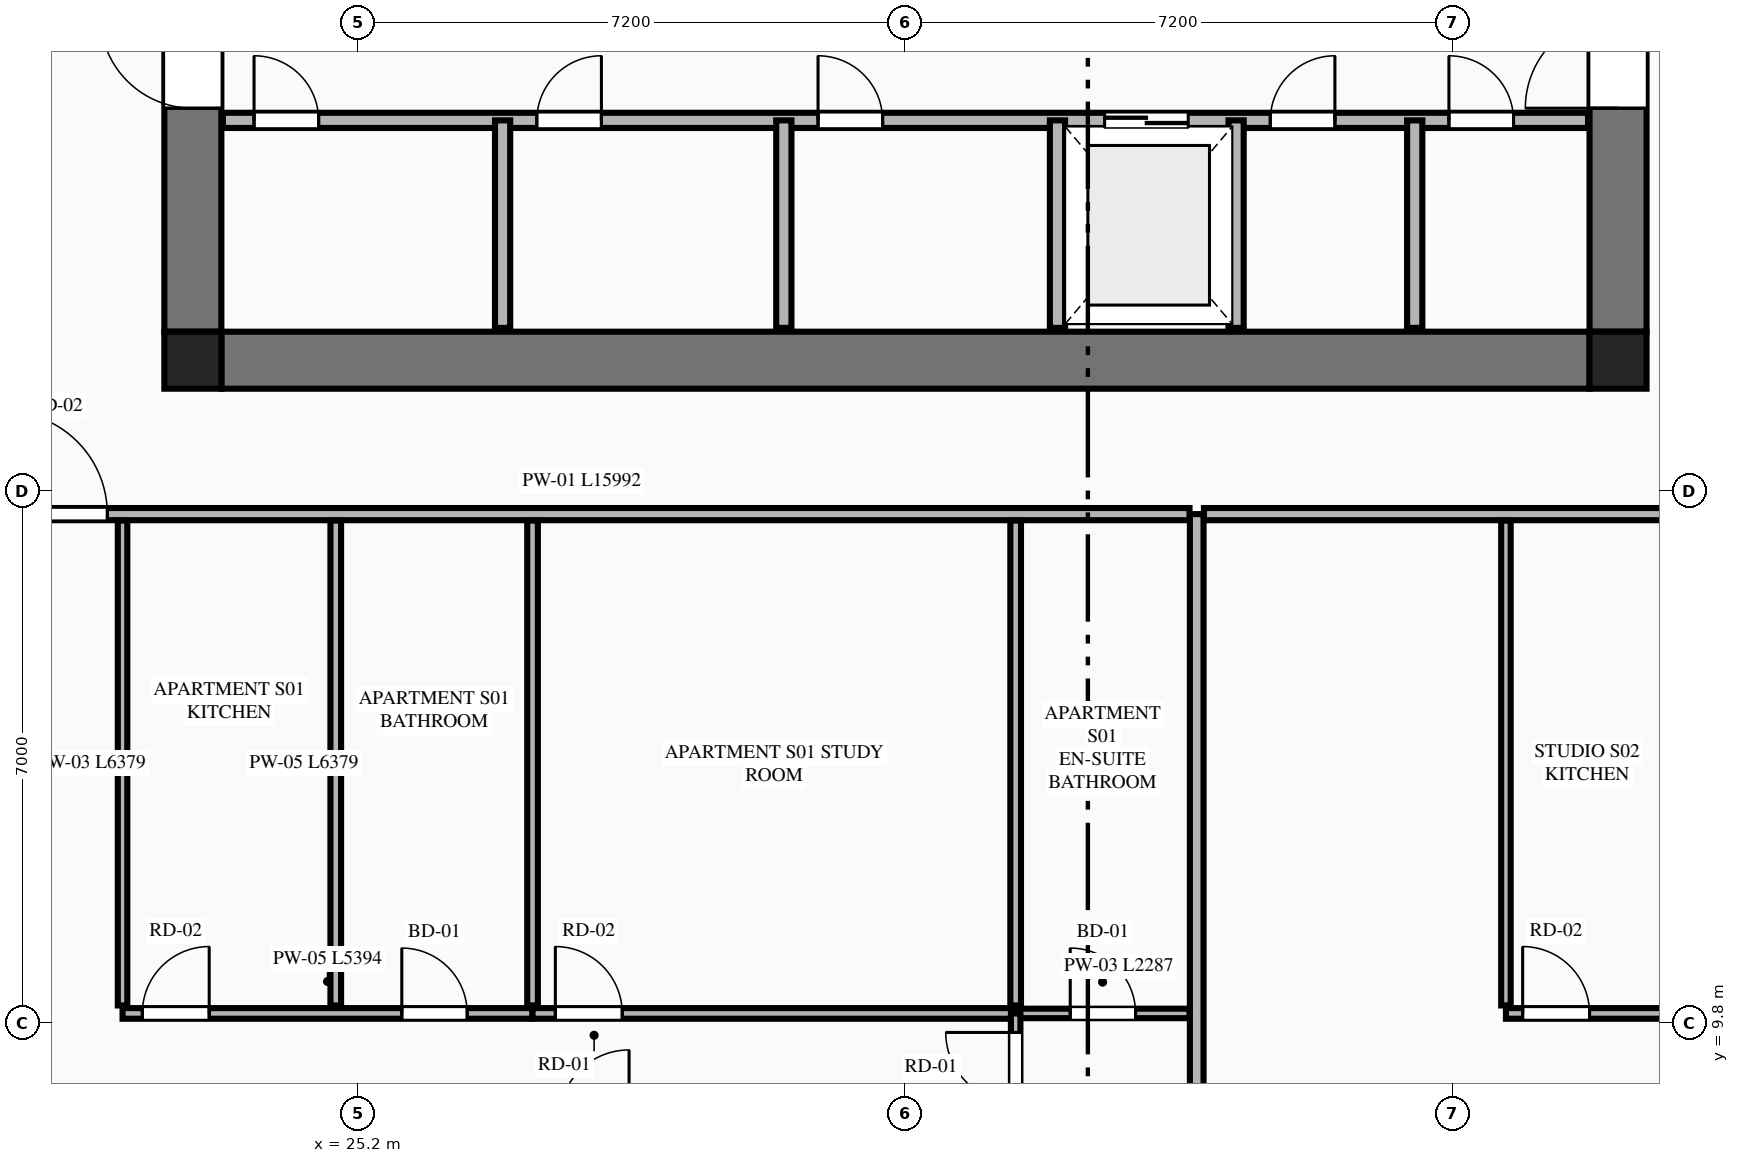
"""IFC4 building model, lengths in metres.
Left out: names, types, materials, properties, quantities, classifications, styles, units other than length and angle.
Written with IfcOpenShell. Run it as: python <this file> out.ifc"""

import sys

from ifc_helpers import new_model, si_unit, direction, frame, frame_2d, origin, origin_2d, place, context, subcontext, project, spatial, rectangle, extrude, element, fill, save


model = new_model("IFC4")
c1 = context("Model", 3, precision=1e-05, world=origin(), true_north=direction((0.0, 1.0)))
c2 = subcontext(c1, "Body", "Model", "MODEL_VIEW")
j1 = project(units=[si_unit("LENGTHUNIT", "METRE"), si_unit("PLANEANGLEUNIT", "RADIAN")], contexts=[c1])
p1 = place(None, origin())
s1 = spatial("IfcSite", under=j1, at=p1, CompositionType="ELEMENT")
p2 = place(p1, origin())
s2 = spatial("IfcBuilding", under=s1, at=p2, CompositionType="ELEMENT")
p3 = place(p2, frame((0.0, 0.0, 109.05)))
s3 = spatial("IfcBuildingStorey", under=s2, at=p3, CompositionType="ELEMENT", Elevation=109.05)
for number, where, z_axis, x_axis in (
    (1, (23.025, 18.525, 0.0), (0.0, 0.0, 1.0), (1.0, 0.0, 0.0)),
    (2, (41.775, 18.525, 0.0), (0.0, 0.0, 1.0), (1.0, 0.0, 0.0)),
):
    element("IfcColumn", number, at=place(p3, frame(where, z_axis=z_axis, x_axis=x_axis)), inside=s3, PredefinedType="COLUMN", context=c2, shape_type="SweptSolid", body=[
        extrude(rectangle(XDim=0.75, YDim=0.75, at=origin_2d()), origin(), (0.0, 0.0, 1.0), 3.55),
    ])
p4 = place(p3, frame((23.4, 18.525, 0.0), z_axis=(0.0, 0.0, 1.0), x_axis=(1.0, 0.0, 0.0)))
e3 = element("IfcWall", 3, at=p4, inside=s3, PredefinedType="SHEAR", context=c2, shape_type="SweptSolid", body=[
    extrude(rectangle(XDim=18.0, YDim=0.75, at=frame_2d((9.0, 0.0))), origin(), (0.0, 0.0, 1.0), 3.34),
])
p5 = place(p3, frame((23.025, 18.9, 0.0), z_axis=(0.0, 0.0, 1.0), x_axis=(0.0, 1.0, 0.0)))
e4 = element("IfcWall", 4, at=p5, inside=s3, PredefinedType="SHEAR", context=c2, shape_type="SweptSolid", body=[
    extrude(rectangle(XDim=14.0, YDim=0.75, at=frame_2d((7.0, 0.0))), origin(), (0.0, 0.0, 1.0), 3.34),
])
p6 = place(p5, frame((2.94, 0.0, 0.0)))
e5 = element("IfcOpeningElement", 5, at=p6, cuts=e4, PredefinedType="OPENING", context=c2, shape_type="SweptSolid", body=[
    extrude(rectangle(XDim=1.22, YDim=2.25, at=frame_2d((0.61, 1.125))), frame((0.0, 0.385, 0.0), z_axis=(0.0, -1.0, 0.0), x_axis=(1.0, 0.0, 0.0)), (0.0, 0.0, 1.0), 0.77),
])
p7 = place(p3, frame((41.775, 18.9, 0.0), z_axis=(0.0, 0.0, 1.0), x_axis=(0.0, 1.0, 0.0)))
e6 = element("IfcWall", 6, at=p7, inside=s3, PredefinedType="SHEAR", context=c2, shape_type="SweptSolid", body=[
    extrude(rectangle(XDim=14.0, YDim=0.75, at=frame_2d((7.0, 0.0))), origin(), (0.0, 0.0, 1.0), 3.34),
])
p8 = place(p7, frame((2.94, 0.0, 0.0)))
e7 = element("IfcOpeningElement", 7, at=p8, cuts=e6, PredefinedType="OPENING", context=c2, shape_type="SweptSolid", body=[
    extrude(rectangle(XDim=1.22, YDim=2.25, at=frame_2d((0.61, 1.125))), frame((0.0, 0.385, 0.0), z_axis=(0.0, -1.0, 0.0), x_axis=(1.0, 0.0, 0.0)), (0.0, 0.0, 1.0), 0.77),
])
p9 = place(p3, frame((23.42, 21.68, 0.0), z_axis=(0.0, 0.0, 1.0), x_axis=(1.0, 0.0, 0.0)))
e8 = element("IfcWall", 8, at=p9, inside=s3, PredefinedType="PLUMBINGWALL", context=c2, shape_type="SweptSolid", body=[
    extrude(rectangle(XDim=17.96, YDim=0.2, at=frame_2d((8.98, 0.0))), origin(), (0.0, 0.0, 1.0), 3.34),
])
p10 = place(p9, frame((11.6, 0.0, 0.0)))
e9 = element("IfcOpeningElement", 9, at=p10, cuts=e8, PredefinedType="OPENING", context=c2, shape_type="SweptSolid", body=[
    extrude(rectangle(XDim=1.1, YDim=2.2, at=frame_2d((0.55, 1.1))), frame((0.0, 0.11, 0.0), z_axis=(0.0, -1.0, 0.0), x_axis=(1.0, 0.0, 0.0)), (0.0, 0.0, 1.0), 0.22),
])
p11 = place(p9, frame((0.41, 0.0, 0.0)))
e10 = element("IfcOpeningElement", 10, at=p11, cuts=e8, PredefinedType="OPENING", context=c2, shape_type="SweptSolid", body=[
    extrude(rectangle(XDim=0.85, YDim=2.05, at=frame_2d((0.425, 1.025))), frame((0.0, 0.11, 0.0), z_axis=(0.0, -1.0, 0.0), x_axis=(1.0, 0.0, 0.0)), (0.0, 0.0, 1.0), 0.22),
])
p12 = place(p9, frame((4.13, 0.0, 0.0)))
e11 = element("IfcOpeningElement", 11, at=p12, cuts=e8, PredefinedType="OPENING", context=c2, shape_type="SweptSolid", body=[
    extrude(rectangle(XDim=0.85, YDim=2.05, at=frame_2d((0.425, 1.025))), frame((0.0, 0.11, 0.0), z_axis=(0.0, -1.0, 0.0), x_axis=(1.0, 0.0, 0.0)), (0.0, 0.0, 1.0), 0.22),
])
p13 = place(p9, frame((7.83, 0.0, 0.0)))
e12 = element("IfcOpeningElement", 12, at=p13, cuts=e8, PredefinedType="OPENING", context=c2, shape_type="SweptSolid", body=[
    extrude(rectangle(XDim=0.85, YDim=2.05, at=frame_2d((0.425, 1.025))), frame((0.0, 0.11, 0.0), z_axis=(0.0, -1.0, 0.0), x_axis=(1.0, 0.0, 0.0)), (0.0, 0.0, 1.0), 0.22),
])
p14 = place(p9, frame((13.78, 0.0, 0.0)))
e13 = element("IfcOpeningElement", 13, at=p14, cuts=e8, PredefinedType="OPENING", context=c2, shape_type="SweptSolid", body=[
    extrude(rectangle(XDim=0.85, YDim=2.05, at=frame_2d((0.425, 1.025))), frame((0.0, 0.11, 0.0), z_axis=(0.0, -1.0, 0.0), x_axis=(1.0, 0.0, 0.0)), (0.0, 0.0, 1.0), 0.22),
])
p15 = place(p9, frame((16.13, 0.0, 0.0)))
e14 = element("IfcOpeningElement", 14, at=p15, cuts=e8, PredefinedType="OPENING", context=c2, shape_type="SweptSolid", body=[
    extrude(rectangle(XDim=0.85, YDim=2.05, at=frame_2d((0.425, 1.025))), frame((0.0, 0.11, 0.0), z_axis=(0.0, -1.0, 0.0), x_axis=(1.0, 0.0, 0.0)), (0.0, 0.0, 1.0), 0.22),
])
for number, where, z_axis, x_axis in (
    (15, (34.4, 18.95, 0.0), (0.0, 0.0, 1.0), (0.0, 1.0, 0.0)),
    (16, (36.75, 18.95, 0.0), (0.0, 0.0, 1.0), (0.0, 1.0, 0.0)),
    (17, (27.1, 18.95, 0.0), (0.0, 0.0, 1.0), (0.0, 1.0, 0.0)),
    (18, (30.8, 18.95, 0.0), (0.0, 0.0, 1.0), (0.0, 1.0, 0.0)),
    (19, (39.1, 18.95, 0.0), (0.0, 0.0, 1.0), (0.0, 1.0, 0.0)),
):
    element("IfcWall", number, at=place(p3, frame(where, z_axis=z_axis, x_axis=x_axis)), inside=s3, PredefinedType="PLUMBINGWALL", context=c2, shape_type="SweptSolid", body=[
        extrude(rectangle(XDim=2.73, YDim=0.2, at=frame_2d((1.365, 0.0))), origin(), (0.0, 0.0, 1.0), 3.34),
    ])
p16 = place(p3, frame((36.232, 4.105, 0.0), z_axis=(0.0, 0.0, 1.0), x_axis=(0.0, 1.0, 0.0)))
e20 = element("IfcWall", 20, at=p16, inside=s3, PredefinedType="PARTITIONING", context=c2, shape_type="SweptSolid", body=[
    extrude(rectangle(XDim=12.395, YDim=0.18, at=frame_2d((6.198, 0.0))), origin(), (0.0, 0.0, 1.0), 2.722),
])
p17 = place(p3, frame((20.145, 16.5, 0.0), z_axis=(0.0, 0.0, 1.0), x_axis=(1.0, 0.0, 0.0)))
e21 = element("IfcWall", 21, at=p17, inside=s3, PredefinedType="PARTITIONING", context=c2, shape_type="SweptSolid", body=[
    extrude(rectangle(XDim=15.992, YDim=0.16, at=frame_2d((7.996, 0.0))), origin(), (0.0, 0.0, 1.0), 3.34),
])
p18 = place(p17, frame((0.405, 0.0, 0.0)))
e22 = element("IfcOpeningElement", 22, at=p18, cuts=e21, PredefinedType="OPENING", context=c2, shape_type="SweptSolid", body=[
    extrude(rectangle(XDim=1.35, YDim=2.35, at=frame_2d((0.675, 1.175))), frame((0.0, 0.09, 0.0), z_axis=(0.0, -1.0, 0.0), x_axis=(1.0, 0.0, 0.0)), (0.0, 0.0, 1.0), 0.18),
])
p19 = place(p3, frame((22.1, 10.036, 0.0), z_axis=(0.0, 0.0, 1.0), x_axis=(0.0, 1.0, 0.0)))
e23 = element("IfcWall", 23, at=p19, inside=s3, PredefinedType="PARTITIONING", context=c2, shape_type="SweptSolid", body=[
    extrude(rectangle(XDim=6.379, YDim=0.125, at=frame_2d((3.189, 0.0))), origin(), (0.0, 0.0, 1.0), 2.722),
])
p20 = place(p3, frame((22.1, 9.931, 0.0), z_axis=(0.0, 0.0, 1.0), x_axis=(1.0, 0.0, 0.0)))
e24 = element("IfcWall", 24, at=p20, inside=s3, PredefinedType="PLUMBINGWALL", context=c2, shape_type="SweptSolid", body=[
    extrude(rectangle(XDim=5.394, YDim=0.14, at=frame_2d((2.697, 0.0))), origin(), (0.0, 0.0, 1.0), 3.34),
])
p21 = place(p20, frame((3.674, 0.0, 0.0)))
e25 = element("IfcOpeningElement", 25, at=p21, cuts=e24, PredefinedType="OPENING", context=c2, shape_type="SweptSolid", body=[
    extrude(rectangle(XDim=0.86, YDim=2.1, at=frame_2d((0.43, 1.05))), frame((0.0, 0.08, 0.0), z_axis=(0.0, -1.0, 0.0), x_axis=(1.0, 0.0, 0.0)), (0.0, 0.0, 1.0), 0.16),
])
p22 = place(p20, frame((0.26, 0.0, 0.0)))
e26 = element("IfcOpeningElement", 26, at=p22, cuts=e24, PredefinedType="OPENING", context=c2, shape_type="SweptSolid", body=[
    extrude(rectangle(XDim=0.88, YDim=2.15, at=frame_2d((0.44, 1.075))), frame((0.0, 0.08, 0.0), z_axis=(0.0, -1.0, 0.0), x_axis=(1.0, 0.0, 0.0)), (0.0, 0.0, 1.0), 0.16),
])
p23 = place(p3, frame((27.494, 9.931, 0.0), z_axis=(0.0, 0.0, 1.0), x_axis=(1.0, 0.0, 0.0)))
e27 = element("IfcWall", 27, at=p23, inside=s3, PredefinedType="PLUMBINGWALL", context=c2, shape_type="SweptSolid", body=[
    extrude(rectangle(XDim=6.356, YDim=0.14, at=frame_2d((3.178, 0.0))), origin(), (0.0, 0.0, 1.0), 3.34),
])
p24 = place(p23, frame((0.3, 0.0, 0.0)))
e28 = element("IfcOpeningElement", 28, at=p24, cuts=e27, PredefinedType="OPENING", context=c2, shape_type="SweptSolid", body=[
    extrude(rectangle(XDim=0.88, YDim=2.15, at=frame_2d((0.44, 1.075))), frame((0.0, 0.08, 0.0), z_axis=(0.0, -1.0, 0.0), x_axis=(1.0, 0.0, 0.0)), (0.0, 0.0, 1.0), 0.16),
])
p25 = place(p3, frame((33.85, 9.931, 0.0), z_axis=(0.0, 0.0, 1.0), x_axis=(1.0, 0.0, 0.0)))
e29 = element("IfcWall", 29, at=p25, inside=s3, PredefinedType="PARTITIONING", context=c2, shape_type="SweptSolid", body=[
    extrude(rectangle(XDim=2.287, YDim=0.125, at=frame_2d((1.144, 0.0))), origin(), (0.0, 0.0, 1.0), 3.34),
])
p26 = place(p25, frame((0.718, 0.0, 0.0)))
e30 = element("IfcOpeningElement", 30, at=p26, cuts=e29, PredefinedType="OPENING", context=c2, shape_type="SweptSolid", body=[
    extrude(rectangle(XDim=0.86, YDim=2.1, at=frame_2d((0.43, 1.05))), frame((0.0, 0.073, 0.0), z_axis=(0.0, -1.0, 0.0), x_axis=(1.0, 0.0, 0.0)), (0.0, 0.0, 1.0), 0.145),
])
p27 = place(p3, frame((24.905, 10.036, 0.0), z_axis=(0.0, 0.0, 1.0), x_axis=(0.0, 1.0, 0.0)))
e31 = element("IfcWall", 31, at=p27, inside=s3, PredefinedType="PLUMBINGWALL", context=c2, shape_type="SweptSolid", body=[
    extrude(rectangle(XDim=6.379, YDim=0.14, at=frame_2d((3.189, 0.0))), origin(), (0.0, 0.0, 1.0), 3.34),
])
p28 = place(p3, frame((33.85, 8.601, 0.0), z_axis=(0.0, 0.0, 1.0), x_axis=(0.0, 1.0, 0.0)))
e32 = element("IfcWall", 32, at=p28, inside=s3, PredefinedType="PARTITIONING", context=c2, shape_type="SweptSolid", body=[
    extrude(rectangle(XDim=1.33, YDim=0.125, at=frame_2d((0.665, 0.0))), origin(), (0.0, 0.0, 1.0), 3.34),
])
p29 = place(p28, frame((0.16, 0.0, 0.0)))
e33 = element("IfcOpeningElement", 33, at=p29, cuts=e32, PredefinedType="OPENING", context=c2, shape_type="SweptSolid", body=[
    extrude(rectangle(XDim=0.92, YDim=2.15, at=frame_2d((0.46, 1.075))), frame((0.0, 0.073, 0.0), z_axis=(0.0, -1.0, 0.0), x_axis=(1.0, 0.0, 0.0)), (0.0, 0.0, 1.0), 0.145),
])
for number, where, z_axis, x_axis in (
    (34, (27.494, 10.036, 0.0), (0.0, 0.0, 1.0), (0.0, 1.0, 0.0)),
    (35, (33.85, 10.036, 0.0), (0.0, 0.0, 1.0), (0.0, 1.0, 0.0)),
):
    element("IfcWall", number, at=place(p3, frame(where, z_axis=z_axis, x_axis=x_axis)), inside=s3, PredefinedType="PLUMBINGWALL", context=c2, shape_type="SweptSolid", body=[
        extrude(rectangle(XDim=6.379, YDim=0.14, at=frame_2d((3.189, 0.0))), origin(), (0.0, 0.0, 1.0), 3.34),
    ])
p30 = place(p3, frame((36.327, 16.5, 0.0), z_axis=(0.0, 0.0, 1.0), x_axis=(1.0, 0.0, 0.0)))
e36 = element("IfcWall", 36, at=p30, inside=s3, PredefinedType="PARTITIONING", context=c2, shape_type="SweptSolid", body=[
    extrude(rectangle(XDim=8.328, YDim=0.16, at=frame_2d((4.164, 0.0))), origin(), (0.0, 0.0, 1.0), 3.34),
])
p31 = place(p30, frame((6.073, 0.0, 0.0)))
e37 = element("IfcOpeningElement", 37, at=p31, cuts=e36, PredefinedType="OPENING", context=c2, shape_type="SweptSolid", body=[
    extrude(rectangle(XDim=1.02, YDim=2.25, at=frame_2d((0.51, 1.125))), frame((0.0, 0.09, 0.0), z_axis=(0.0, -1.0, 0.0), x_axis=(1.0, 0.0, 0.0)), (0.0, 0.0, 1.0), 0.18),
])
p32 = place(p3, frame((40.3, 10.036, 0.0), z_axis=(0.0, 0.0, 1.0), x_axis=(0.0, 1.0, 0.0)))
e38 = element("IfcWall", 38, at=p32, inside=s3, PredefinedType="PARTITIONING", context=c2, shape_type="SweptSolid", body=[
    extrude(rectangle(XDim=6.379, YDim=0.125, at=frame_2d((3.189, 0.0))), origin(), (0.0, 0.0, 1.0), 3.34),
])
p33 = place(p3, frame((40.3, 9.931, 0.0), z_axis=(0.0, 0.0, 1.0), x_axis=(1.0, 0.0, 0.0)))
e39 = element("IfcWall", 39, at=p33, inside=s3, PredefinedType="PLUMBINGWALL", context=c2, shape_type="SweptSolid", body=[
    extrude(rectangle(XDim=4.355, YDim=0.14, at=frame_2d((2.177, 0.0))), origin(), (0.0, 0.0, 1.0), 3.34),
])
p34 = place(p33, frame((2.821, 0.0, 0.0)))
e40 = element("IfcOpeningElement", 40, at=p34, cuts=e39, PredefinedType="OPENING", context=c2, shape_type="SweptSolid", body=[
    extrude(rectangle(XDim=0.86, YDim=2.1, at=frame_2d((0.43, 1.05))), frame((0.0, 0.08, 0.0), z_axis=(0.0, -1.0, 0.0), x_axis=(1.0, 0.0, 0.0)), (0.0, 0.0, 1.0), 0.16),
])
p35 = place(p33, frame((0.22, 0.0, 0.0)))
e41 = element("IfcOpeningElement", 41, at=p35, cuts=e39, PredefinedType="OPENING", context=c2, shape_type="SweptSolid", body=[
    extrude(rectangle(XDim=0.88, YDim=2.15, at=frame_2d((0.44, 1.075))), frame((0.0, 0.08, 0.0), z_axis=(0.0, -1.0, 0.0), x_axis=(1.0, 0.0, 0.0)), (0.0, 0.0, 1.0), 0.16),
])
p36 = place(p6, origin())
e42 = element("IfcDoor", 42, at=p36, inside=s3, OperationType="SINGLE_SWING_RIGHT", PredefinedType="DOOR", context=c2, shape_type="SweptSolid", body=[
    extrude(rectangle(XDim=1.22, YDim=2.25, at=frame_2d((0.61, 1.125))), frame((0.0, 0.025, 0.0), z_axis=(0.0, -1.0, 0.0), x_axis=(1.0, 0.0, 0.0)), (0.0, 0.0, 1.0), 0.05),
])
fill(e5, e42)
p37 = place(p8, origin())
e43 = element("IfcDoor", 43, at=p37, inside=s3, OperationType="SINGLE_SWING_LEFT", PredefinedType="DOOR", context=c2, shape_type="SweptSolid", body=[
    extrude(rectangle(XDim=1.22, YDim=2.25, at=frame_2d((0.61, 1.125))), frame((0.0, 0.025, 0.0), z_axis=(0.0, -1.0, 0.0), x_axis=(1.0, 0.0, 0.0)), (0.0, 0.0, 1.0), 0.05),
])
fill(e7, e43)
p38 = place(p10, origin())
e44 = element("IfcDoor", 44, at=p38, inside=s3, OperationType="DOUBLE_DOOR_SLIDING", PredefinedType="DOOR", context=c2, shape_type="SweptSolid", body=[
    extrude(rectangle(XDim=1.1, YDim=2.2, at=frame_2d((0.55, 1.1))), frame((0.0, 0.025, 0.0), z_axis=(0.0, -1.0, 0.0), x_axis=(1.0, 0.0, 0.0)), (0.0, 0.0, 1.0), 0.05),
])
fill(e9, e44)
p39 = place(p11, origin())
e45 = element("IfcDoor", 45, at=p39, inside=s3, OperationType="SINGLE_SWING_LEFT", PredefinedType="DOOR", context=c2, shape_type="SweptSolid", body=[
    extrude(rectangle(XDim=0.85, YDim=2.05, at=frame_2d((0.425, 1.025))), frame((0.0, 0.025, 0.0), z_axis=(0.0, -1.0, 0.0), x_axis=(1.0, 0.0, 0.0)), (0.0, 0.0, 1.0), 0.05),
])
fill(e10, e45)
p40 = place(p12, origin())
e46 = element("IfcDoor", 46, at=p40, inside=s3, OperationType="SINGLE_SWING_RIGHT", PredefinedType="DOOR", context=c2, shape_type="SweptSolid", body=[
    extrude(rectangle(XDim=0.85, YDim=2.05, at=frame_2d((0.425, 1.025))), frame((0.0, 0.025, 0.0), z_axis=(0.0, -1.0, 0.0), x_axis=(1.0, 0.0, 0.0)), (0.0, 0.0, 1.0), 0.05),
])
fill(e11, e46)
p41 = place(p13, origin())
e47 = element("IfcDoor", 47, at=p41, inside=s3, OperationType="SINGLE_SWING_LEFT", PredefinedType="DOOR", context=c2, shape_type="SweptSolid", body=[
    extrude(rectangle(XDim=0.85, YDim=2.05, at=frame_2d((0.425, 1.025))), frame((0.0, 0.025, 0.0), z_axis=(0.0, -1.0, 0.0), x_axis=(1.0, 0.0, 0.0)), (0.0, 0.0, 1.0), 0.05),
])
fill(e12, e47)
p42 = place(p14, origin())
e48 = element("IfcDoor", 48, at=p42, inside=s3, OperationType="SINGLE_SWING_RIGHT", PredefinedType="DOOR", context=c2, shape_type="SweptSolid", body=[
    extrude(rectangle(XDim=0.85, YDim=2.05, at=frame_2d((0.425, 1.025))), frame((0.0, 0.025, 0.0), z_axis=(0.0, -1.0, 0.0), x_axis=(1.0, 0.0, 0.0)), (0.0, 0.0, 1.0), 0.05),
])
fill(e13, e48)
p43 = place(p15, origin())
e49 = element("IfcDoor", 49, at=p43, inside=s3, OperationType="SINGLE_SWING_LEFT", PredefinedType="DOOR", context=c2, shape_type="SweptSolid", body=[
    extrude(rectangle(XDim=0.85, YDim=2.05, at=frame_2d((0.425, 1.025))), frame((0.0, 0.025, 0.0), z_axis=(0.0, -1.0, 0.0), x_axis=(1.0, 0.0, 0.0)), (0.0, 0.0, 1.0), 0.05),
])
fill(e14, e49)
p44 = place(p21, origin())
e50 = element("IfcDoor", 50, at=p44, inside=s3, OperationType="SINGLE_SWING_LEFT", PredefinedType="DOOR", context=c2, shape_type="SweptSolid", body=[
    extrude(rectangle(XDim=0.86, YDim=2.1, at=frame_2d((0.43, 1.05))), frame((0.0, 0.025, 0.0), z_axis=(0.0, -1.0, 0.0), x_axis=(1.0, 0.0, 0.0)), (0.0, 0.0, 1.0), 0.05),
])
fill(e25, e50)
p45 = place(p26, origin())
e51 = element("IfcDoor", 51, at=p45, inside=s3, OperationType="SINGLE_SWING_LEFT", PredefinedType="DOOR", context=c2, shape_type="SweptSolid", body=[
    extrude(rectangle(XDim=0.86, YDim=2.1, at=frame_2d((0.43, 1.05))), frame((0.0, 0.025, 0.0), z_axis=(0.0, -1.0, 0.0), x_axis=(1.0, 0.0, 0.0)), (0.0, 0.0, 1.0), 0.05),
])
fill(e30, e51)
p46 = place(p18, origin())
e52 = element("IfcDoor", 52, at=p46, inside=s3, OperationType="SINGLE_SWING_LEFT", PredefinedType="DOOR", context=c2, shape_type="SweptSolid", body=[
    extrude(rectangle(XDim=1.35, YDim=2.35, at=frame_2d((0.675, 1.175))), frame((0.0, 0.025, 0.0), z_axis=(0.0, -1.0, 0.0), x_axis=(1.0, 0.0, 0.0)), (0.0, 0.0, 1.0), 0.05),
])
fill(e22, e52)
p47 = place(p22, origin())
e53 = element("IfcDoor", 53, at=p47, inside=s3, OperationType="SINGLE_SWING_RIGHT", PredefinedType="DOOR", context=c2, shape_type="SweptSolid", body=[
    extrude(rectangle(XDim=0.88, YDim=2.15, at=frame_2d((0.44, 1.075))), frame((0.0, 0.025, 0.0), z_axis=(0.0, -1.0, 0.0), x_axis=(1.0, 0.0, 0.0)), (0.0, 0.0, 1.0), 0.05),
])
fill(e26, e53)
p48 = place(p24, origin())
e54 = element("IfcDoor", 54, at=p48, inside=s3, OperationType="SINGLE_SWING_LEFT", PredefinedType="DOOR", context=c2, shape_type="SweptSolid", body=[
    extrude(rectangle(XDim=0.88, YDim=2.15, at=frame_2d((0.44, 1.075))), frame((0.0, 0.025, 0.0), z_axis=(0.0, -1.0, 0.0), x_axis=(1.0, 0.0, 0.0)), (0.0, 0.0, 1.0), 0.05),
])
fill(e28, e54)
p49 = place(p29, origin())
e55 = element("IfcDoor", 55, at=p49, inside=s3, OperationType="SINGLE_SWING_RIGHT", PredefinedType="DOOR", context=c2, shape_type="SweptSolid", body=[
    extrude(rectangle(XDim=0.92, YDim=2.15, at=frame_2d((0.46, 1.075))), frame((0.0, 0.025, 0.0), z_axis=(0.0, -1.0, 0.0), x_axis=(1.0, 0.0, 0.0)), (0.0, 0.0, 1.0), 0.05),
])
fill(e33, e55)
p50 = place(p35, origin())
e56 = element("IfcDoor", 56, at=p50, inside=s3, OperationType="SINGLE_SWING_LEFT", PredefinedType="DOOR", context=c2, shape_type="SweptSolid", body=[
    extrude(rectangle(XDim=0.88, YDim=2.15, at=frame_2d((0.44, 1.075))), frame((0.0, 0.025, 0.0), z_axis=(0.0, -1.0, 0.0), x_axis=(1.0, 0.0, 0.0)), (0.0, 0.0, 1.0), 0.05),
])
fill(e41, e56)
save(model, sys.argv[1])
